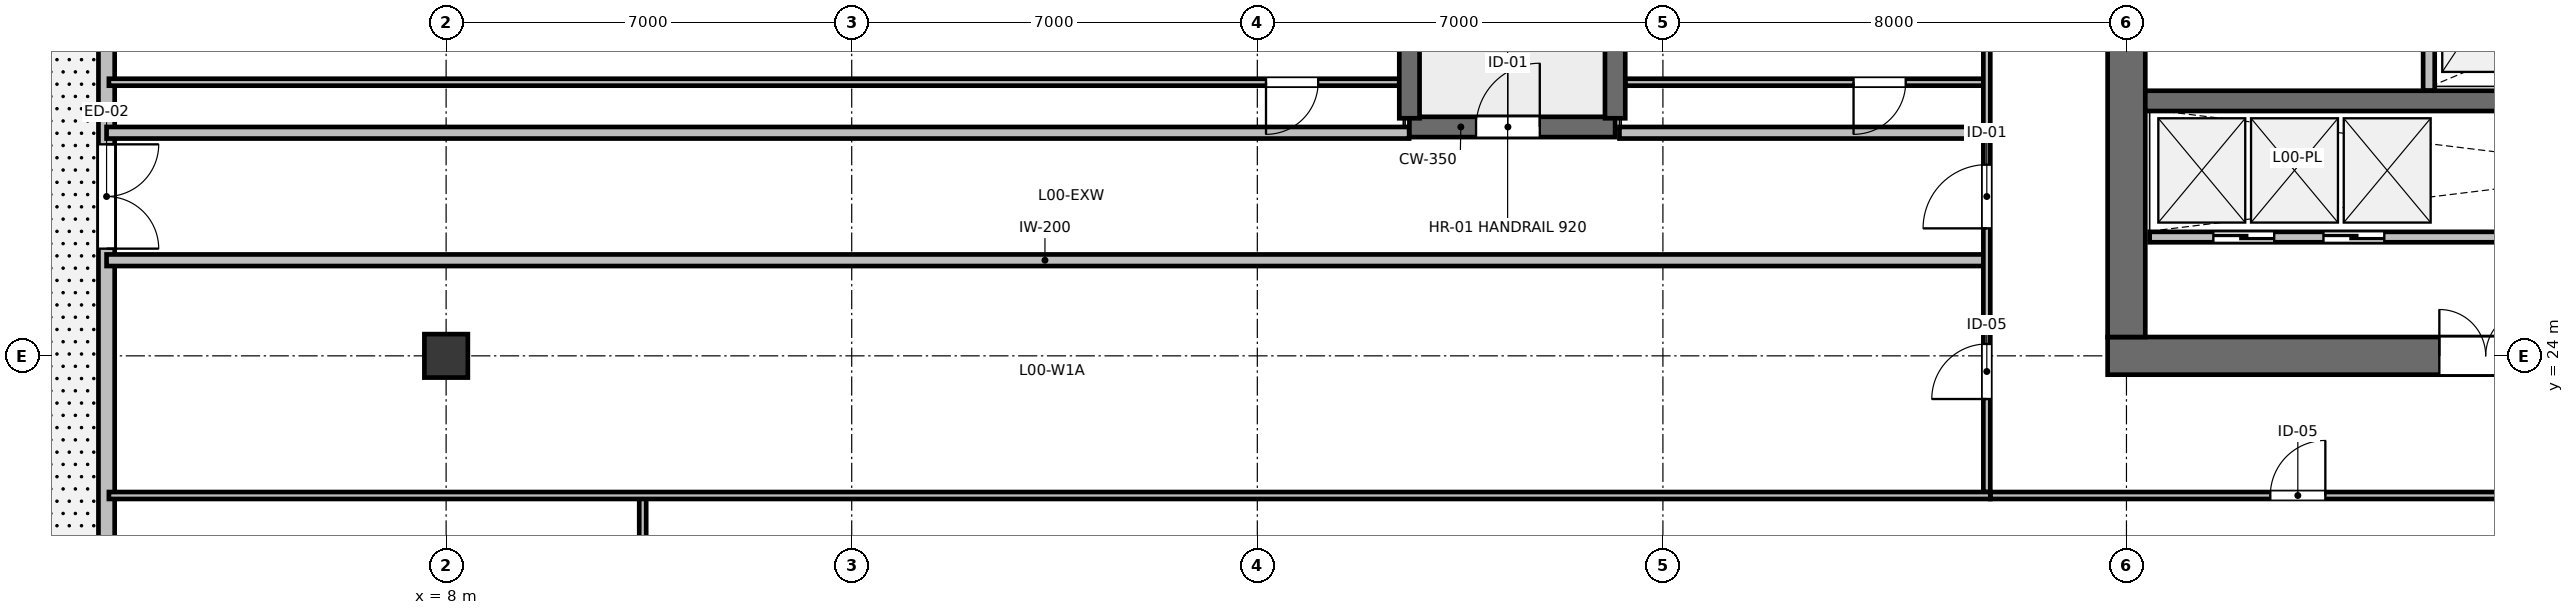
"""IFC4 building model, lengths in metres.
Left out: names, types, materials, properties, quantities, classifications, styles, units other than length and angle.
Written with IfcOpenShell. Run it as: python <this file> out.ifc"""

import sys

from ifc_helpers import new_model, si_unit, direction, frame, frame_2d, origin, origin_2d, place, context, subcontext, project, spatial, rectangle, extrude, element, fill, save


model = new_model("IFC4")
c1 = context("Model", 3, precision=1e-05, world=origin(), true_north=direction((0.0, 1.0)))
c2 = subcontext(c1, "Body", "Model", "MODEL_VIEW")
j1 = project(units=[si_unit("LENGTHUNIT", "METRE"), si_unit("PLANEANGLEUNIT", "RADIAN")], contexts=[c1])
p1 = place(None, origin())
s1 = spatial("IfcSite", under=j1, at=p1, CompositionType="ELEMENT")
p2 = place(p1, origin())
s2 = spatial("IfcBuilding", under=s1, at=p2, CompositionType="ELEMENT")
p3 = place(p2, origin())
s3 = spatial("IfcBuildingStorey", under=s2, at=p3, CompositionType="ELEMENT", Elevation=0.0)
p4 = place(p3, frame((36.675, 24.0, 0.0), z_axis=(0.0, 0.0, 1.0), x_axis=(1.0, 0.0, 0.0)))
e1 = element("IfcWall", 1, at=p4, inside=s3, PredefinedType="SHEAR", context=c2, shape_type="SweptSolid", body=[
    extrude(rectangle(XDim=18.65, YDim=0.65, at=frame_2d((9.325, 0.0))), origin(), (0.0, 0.0, 1.0), 4.72),
])
p5 = place(p4, frame((5.725, 0.0, 0.0)))
e2 = element("IfcOpeningElement", 2, at=p5, cuts=e1, PredefinedType="OPENING", context=c2, shape_type="SweptSolid", body=[
    extrude(rectangle(XDim=1.6, YDim=2.15, at=frame_2d((0.8, 1.075))), frame((0.0, 0.335, 0.0), z_axis=(0.0, -1.0, 0.0), x_axis=(1.0, 0.0, 0.0)), (0.0, 0.0, 1.0), 0.67),
])
p6 = place(p4, frame((12.125, 0.0, 0.0)))
e3 = element("IfcOpeningElement", 3, at=p6, cuts=e1, PredefinedType="OPENING", context=c2, shape_type="SweptSolid", body=[
    extrude(rectangle(XDim=1.6, YDim=2.15, at=frame_2d((0.8, 1.075))), frame((0.0, 0.335, 0.0), z_axis=(0.0, -1.0, 0.0), x_axis=(1.0, 0.0, 0.0)), (0.0, 0.0, 1.0), 0.67),
])
p7 = place(p3, frame((37.0, 24.325, 0.0), z_axis=(0.0, 0.0, 1.0), x_axis=(0.0, 1.0, 0.0)))
e4 = element("IfcWall", 4, at=p7, inside=s3, PredefinedType="SHEAR", context=c2, shape_type="SweptSolid", body=[
    extrude(rectangle(XDim=15.35, YDim=0.65, at=frame_2d((7.675, 0.0))), origin(), (0.0, 0.0, 1.0), 4.72),
])
p8 = place(p7, frame((5.2, 0.0, 0.0)))
e5 = element("IfcOpeningElement", 5, at=p8, cuts=e4, PredefinedType="OPENING", context=c2, shape_type="SweptSolid", body=[
    extrude(rectangle(XDim=1.15, YDim=2.15, at=frame_2d((0.575, 1.075))), frame((0.0, 0.335, 0.0), z_axis=(0.0, -1.0, 0.0), x_axis=(1.0, 0.0, 0.0)), (0.0, 0.0, 1.0), 0.67),
])
p9 = place(p3, frame((37.325, 28.4, 0.0), z_axis=(0.0, 0.0, 1.0), x_axis=(1.0, 0.0, 0.0)))
e6 = element("IfcWall", 6, at=p9, inside=s3, PredefinedType="SHEAR", context=c2, shape_type="SweptSolid", body=[
    extrude(rectangle(XDim=17.35, YDim=0.35, at=frame_2d((8.675, 0.0))), origin(), (0.0, 0.0, 1.0), 4.72),
])
p10 = place(p3, frame((2.14, 57.64, 0.0), z_axis=(0.0, 0.0, 1.0), x_axis=(0.0, -1.0, 0.0)))
e7 = element("IfcWall", 7, at=p10, inside=s3, PredefinedType="STANDARD", context=c2, shape_type="SweptSolid", body=[
    extrude(rectangle(XDim=51.28, YDim=0.28, at=frame_2d((25.64, 0.0))), origin(), (0.0, 0.0, 1.0), 4.72),
])
p11 = place(p10, frame((29.99, 0.0, 0.0)))
e8 = element("IfcOpeningElement", 8, at=p11, cuts=e7, PredefinedType="OPENING", context=c2, shape_type="SweptSolid", body=[
    extrude(rectangle(XDim=1.8, YDim=2.4, at=frame_2d((0.9, 1.2))), frame((0.0, 0.15, 0.0), z_axis=(0.0, -1.0, 0.0), x_axis=(1.0, 0.0, 0.0)), (0.0, 0.0, 1.0), 0.3),
])
p12 = place(p10, frame((1.788, 0.0, 0.85)))
e9 = element("IfcOpeningElement", 9, at=p12, cuts=e7, PredefinedType="OPENING", context=c2, shape_type="SweptSolid", body=[
    extrude(rectangle(XDim=2.4, YDim=2.4, at=frame_2d((1.2, 1.2))), frame((0.0, 0.15, 0.0), z_axis=(0.0, -1.0, 0.0), x_axis=(1.0, 0.0, 0.0)), (0.0, 0.0, 1.0), 0.3),
])
p13 = place(p10, frame((5.563, 0.0, 0.85)))
e10 = element("IfcOpeningElement", 10, at=p13, cuts=e7, PredefinedType="OPENING", context=c2, shape_type="SweptSolid", body=[
    extrude(rectangle(XDim=2.4, YDim=2.4, at=frame_2d((1.2, 1.2))), frame((0.0, 0.15, 0.0), z_axis=(0.0, -1.0, 0.0), x_axis=(1.0, 0.0, 0.0)), (0.0, 0.0, 1.0), 0.3),
])
p14 = place(p10, frame((9.338, 0.0, 0.85)))
e11 = element("IfcOpeningElement", 11, at=p14, cuts=e7, PredefinedType="OPENING", context=c2, shape_type="SweptSolid", body=[
    extrude(rectangle(XDim=2.4, YDim=2.4, at=frame_2d((1.2, 1.2))), frame((0.0, 0.15, 0.0), z_axis=(0.0, -1.0, 0.0), x_axis=(1.0, 0.0, 0.0)), (0.0, 0.0, 1.0), 0.3),
])
p15 = place(p10, frame((16.889, 0.0, 0.85)))
e12 = element("IfcOpeningElement", 12, at=p15, cuts=e7, PredefinedType="OPENING", context=c2, shape_type="SweptSolid", body=[
    extrude(rectangle(XDim=2.4, YDim=2.4, at=frame_2d((1.2, 1.2))), frame((0.0, 0.15, 0.0), z_axis=(0.0, -1.0, 0.0), x_axis=(1.0, 0.0, 0.0)), (0.0, 0.0, 1.0), 0.3),
])
p16 = place(p10, frame((20.665, 0.0, 0.85)))
e13 = element("IfcOpeningElement", 13, at=p16, cuts=e7, PredefinedType="OPENING", context=c2, shape_type="SweptSolid", body=[
    extrude(rectangle(XDim=2.4, YDim=2.4, at=frame_2d((1.2, 1.2))), frame((0.0, 0.15, 0.0), z_axis=(0.0, -1.0, 0.0), x_axis=(1.0, 0.0, 0.0)), (0.0, 0.0, 1.0), 0.3),
])
p17 = place(p10, frame((24.44, 0.0, 0.85)))
e14 = element("IfcOpeningElement", 14, at=p17, cuts=e7, PredefinedType="OPENING", context=c2, shape_type="SweptSolid", body=[
    extrude(rectangle(XDim=2.4, YDim=2.4, at=frame_2d((1.2, 1.2))), frame((0.0, 0.15, 0.0), z_axis=(0.0, -1.0, 0.0), x_axis=(1.0, 0.0, 0.0)), (0.0, 0.0, 1.0), 0.3),
])
p18 = place(p10, frame((39.542, 0.0, 0.85)))
e15 = element("IfcOpeningElement", 15, at=p18, cuts=e7, PredefinedType="OPENING", context=c2, shape_type="SweptSolid", body=[
    extrude(rectangle(XDim=2.4, YDim=2.4, at=frame_2d((1.2, 1.2))), frame((0.0, 0.15, 0.0), z_axis=(0.0, -1.0, 0.0), x_axis=(1.0, 0.0, 0.0)), (0.0, 0.0, 1.0), 0.3),
])
p19 = place(p10, frame((43.317, 0.0, 0.85)))
e16 = element("IfcOpeningElement", 16, at=p19, cuts=e7, PredefinedType="OPENING", context=c2, shape_type="SweptSolid", body=[
    extrude(rectangle(XDim=2.4, YDim=2.4, at=frame_2d((1.2, 1.2))), frame((0.0, 0.15, 0.0), z_axis=(0.0, -1.0, 0.0), x_axis=(1.0, 0.0, 0.0)), (0.0, 0.0, 1.0), 0.3),
])
p20 = place(p10, frame((47.092, 0.0, 0.85)))
e17 = element("IfcOpeningElement", 17, at=p20, cuts=e7, PredefinedType="OPENING", context=c2, shape_type="SweptSolid", body=[
    extrude(rectangle(XDim=2.4, YDim=2.4, at=frame_2d((1.2, 1.2))), frame((0.0, 0.15, 0.0), z_axis=(0.0, -1.0, 0.0), x_axis=(1.0, 0.0, 0.0)), (0.0, 0.0, 1.0), 0.3),
])
p21 = place(p3, frame((42.22, 28.58, 0.0), z_axis=(0.0, 0.0, 1.0), x_axis=(0.0, 1.0, 0.0)))
e18 = element("IfcWall", 18, at=p21, inside=s3, PredefinedType="PARTITIONING", context=c2, shape_type="SweptSolid", body=[
    extrude(rectangle(XDim=3.04, YDim=0.2, at=frame_2d((1.52, 0.0))), origin(), (0.0, 0.0, 1.0), 4.72),
])
p22 = place(p21, frame((0.95, 0.0, 0.0)))
e19 = element("IfcOpeningElement", 19, at=p22, cuts=e18, PredefinedType="OPENING", context=c2, shape_type="SweptSolid", body=[
    extrude(rectangle(XDim=1.05, YDim=2.15, at=frame_2d((0.525, 1.075))), frame((0.0, 0.11, 0.0), z_axis=(0.0, -1.0, 0.0), x_axis=(1.0, 0.0, 0.0)), (0.0, 0.0, 1.0), 0.22),
])
p23 = place(p3, frame((37.4, 26.05, 0.0), z_axis=(0.0, 0.0, 1.0), x_axis=(1.0, 0.0, 0.0)))
e20 = element("IfcWall", 20, at=p23, inside=s3, PredefinedType="PARTITIONING", context=c2, shape_type="SweptSolid", body=[
    extrude(rectangle(XDim=17.2, YDim=0.18, at=frame_2d((8.6, 0.0))), origin(), (0.0, 0.0, 1.0), 4.72),
])
p24 = place(p23, frame((1.1, 0.0, 0.0)))
e21 = element("IfcOpeningElement", 21, at=p24, cuts=e20, PredefinedType="OPENING", context=c2, shape_type="SweptSolid", body=[
    extrude(rectangle(XDim=1.05, YDim=2.15, at=frame_2d((0.525, 1.075))), frame((0.0, 0.1, 0.0), z_axis=(0.0, -1.0, 0.0), x_axis=(1.0, 0.0, 0.0)), (0.0, 0.0, 1.0), 0.2),
])
p25 = place(p23, frame((3.0, 0.0, 0.0)))
e22 = element("IfcOpeningElement", 22, at=p25, cuts=e20, PredefinedType="OPENING", context=c2, shape_type="SweptSolid", body=[
    extrude(rectangle(XDim=1.05, YDim=2.15, at=frame_2d((0.525, 1.075))), frame((0.0, 0.1, 0.0), z_axis=(0.0, -1.0, 0.0), x_axis=(1.0, 0.0, 0.0)), (0.0, 0.0, 1.0), 0.2),
])
p26 = place(p23, frame((11.4, 0.0, 0.0)))
e23 = element("IfcOpeningElement", 23, at=p26, cuts=e20, PredefinedType="OPENING", context=c2, shape_type="SweptSolid", body=[
    extrude(rectangle(XDim=1.05, YDim=2.15, at=frame_2d((0.525, 1.075))), frame((0.0, 0.1, 0.0), z_axis=(0.0, -1.0, 0.0), x_axis=(1.0, 0.0, 0.0)), (0.0, 0.0, 1.0), 0.2),
])
p27 = place(p3, frame((2.14, 25.65, 0.0), z_axis=(0.0, 0.0, 1.0), x_axis=(1.0, 0.0, 0.0)))
e24 = element("IfcWall", 24, at=p27, inside=s3, PredefinedType="PARTITIONING", context=c2, shape_type="SweptSolid", body=[
    extrude(rectangle(XDim=32.39, YDim=0.2, at=frame_2d((16.195, 0.0))), origin(), (0.0, 0.0, 1.0), 4.72),
])
p28 = place(p3, frame((2.14, 27.85, 0.0), z_axis=(0.0, 0.0, 1.0), x_axis=(1.0, 0.0, 0.0)))
e25 = element("IfcWall", 25, at=p28, inside=s3, PredefinedType="PARTITIONING", context=c2, shape_type="SweptSolid", body=[
    extrude(rectangle(XDim=22.48, YDim=0.2, at=frame_2d((11.24, 0.0))), origin(), (0.0, 0.0, 1.0), 4.72),
])
p29 = place(p3, frame((28.25, 27.85, 0.0), z_axis=(0.0, 0.0, 1.0), x_axis=(1.0, 0.0, 0.0)))
e26 = element("IfcWall", 26, at=p29, inside=s3, PredefinedType="PARTITIONING", context=c2, shape_type="SweptSolid", body=[
    extrude(rectangle(XDim=6.28, YDim=0.2, at=frame_2d((3.14, 0.0))), origin(), (0.0, 0.0, 1.0), 4.72),
])
p30 = place(p3, frame((11.393, 21.59, 0.0), z_axis=(0.0, 0.0, 1.0), x_axis=(0.0, -1.0, 0.0)))
e27 = element("IfcWall", 27, at=p30, inside=s3, PredefinedType="MOVABLE", context=c2, shape_type="SweptSolid", body=[
    extrude(rectangle(XDim=19.41, YDim=0.12, at=frame_2d((9.705, 0.0))), origin(), (0.0, 0.0, 1.0), 3.82),
])
p31 = place(p30, frame((1.4, 0.0, 0.0)))
e28 = element("IfcOpeningElement", 28, at=p31, cuts=e27, PredefinedType="OPENING", context=c2, shape_type="SweptSolid", body=[
    extrude(rectangle(XDim=0.9, YDim=2.15, at=frame_2d((0.45, 1.075))), frame((0.0, 0.07, 0.0), z_axis=(0.0, -1.0, 0.0), x_axis=(1.0, 0.0, 0.0)), (0.0, 0.0, 1.0), 0.14),
])
p32 = place(p3, frame((34.65, 21.59, 0.0), z_axis=(0.0, 0.0, 1.0), x_axis=(1.0, 0.0, 0.0)))
e29 = element("IfcWall", 29, at=p32, inside=s3, PredefinedType="PARTITIONING", context=c2, shape_type="SweptSolid", body=[
    extrude(rectangle(XDim=22.7, YDim=0.12, at=frame_2d((11.35, 0.0))), origin(), (0.0, 0.0, 1.0), 3.82),
])
p33 = place(p32, frame((4.833, 0.0, 0.0)))
e30 = element("IfcOpeningElement", 30, at=p33, cuts=e29, PredefinedType="OPENING", context=c2, shape_type="SweptSolid", body=[
    extrude(rectangle(XDim=0.95, YDim=2.15, at=frame_2d((0.475, 1.075))), frame((0.0, 0.07, 0.0), z_axis=(0.0, -1.0, 0.0), x_axis=(1.0, 0.0, 0.0)), (0.0, 0.0, 1.0), 0.14),
])
p34 = place(p32, frame((16.042, 0.0, 0.0)))
e31 = element("IfcOpeningElement", 31, at=p34, cuts=e29, PredefinedType="OPENING", context=c2, shape_type="SweptSolid", body=[
    extrude(rectangle(XDim=0.95, YDim=2.15, at=frame_2d((0.475, 1.075))), frame((0.0, 0.07, 0.0), z_axis=(0.0, -1.0, 0.0), x_axis=(1.0, 0.0, 0.0)), (0.0, 0.0, 1.0), 0.14),
])
p35 = place(p3, frame((34.59, 28.722, 0.0), z_axis=(0.0, 0.0, 1.0), x_axis=(-1.0, 0.0, 0.0)))
e32 = element("IfcWall", 32, at=p35, inside=s3, PredefinedType="PARTITIONING", context=c2, shape_type="SweptSolid", body=[
    extrude(rectangle(XDim=6.24, YDim=0.12, at=frame_2d((3.12, 0.0))), origin(), (0.0, 0.0, 1.0), 3.82),
])
p36 = place(p35, frame((1.4, 0.0, 0.0)))
e33 = element("IfcOpeningElement", 33, at=p36, cuts=e32, PredefinedType="OPENING", context=c2, shape_type="SweptSolid", body=[
    extrude(rectangle(XDim=0.9, YDim=2.15, at=frame_2d((0.45, 1.075))), frame((0.0, 0.07, 0.0), z_axis=(0.0, -1.0, 0.0), x_axis=(1.0, 0.0, 0.0)), (0.0, 0.0, 1.0), 0.14),
])
p37 = place(p3, frame((24.45, 28.722, 0.0), z_axis=(0.0, 0.0, 1.0), x_axis=(-1.0, 0.0, 0.0)))
e34 = element("IfcWall", 34, at=p37, inside=s3, PredefinedType="PARTITIONING", context=c2, shape_type="SweptSolid", body=[
    extrude(rectangle(XDim=22.27, YDim=0.12, at=frame_2d((11.135, 0.0))), origin(), (0.0, 0.0, 1.0), 3.82),
])
p38 = place(p37, frame((1.4, 0.0, 0.0)))
e35 = element("IfcOpeningElement", 35, at=p38, cuts=e34, PredefinedType="OPENING", context=c2, shape_type="SweptSolid", body=[
    extrude(rectangle(XDim=0.9, YDim=2.15, at=frame_2d((0.45, 1.075))), frame((0.0, 0.07, 0.0), z_axis=(0.0, -1.0, 0.0), x_axis=(1.0, 0.0, 0.0)), (0.0, 0.0, 1.0), 0.14),
])
p39 = place(p3, frame((34.59, 21.65, 0.0), z_axis=(0.0, 0.0, 1.0), x_axis=(0.0, 1.0, 0.0)))
e36 = element("IfcWall", 36, at=p39, inside=s3, PredefinedType="PARTITIONING", context=c2, shape_type="SweptSolid", body=[
    extrude(rectangle(XDim=20.7, YDim=0.12, at=frame_2d((10.35, 0.0))), origin(), (0.0, 0.0, 1.0), 3.82),
])
p40 = place(p39, frame((1.605, 0.0, 0.0)))
e37 = element("IfcOpeningElement", 37, at=p40, cuts=e36, PredefinedType="OPENING", context=c2, shape_type="SweptSolid", body=[
    extrude(rectangle(XDim=0.95, YDim=2.15, at=frame_2d((0.475, 1.075))), frame((0.0, 0.07, 0.0), z_axis=(0.0, -1.0, 0.0), x_axis=(1.0, 0.0, 0.0)), (0.0, 0.0, 1.0), 0.14),
])
p41 = place(p39, frame((13.311, 0.0, 0.0)))
e38 = element("IfcOpeningElement", 38, at=p41, cuts=e36, PredefinedType="OPENING", context=c2, shape_type="SweptSolid", body=[
    extrude(rectangle(XDim=0.95, YDim=2.15, at=frame_2d((0.475, 1.075))), frame((0.0, 0.07, 0.0), z_axis=(0.0, -1.0, 0.0), x_axis=(1.0, 0.0, 0.0)), (0.0, 0.0, 1.0), 0.14),
])
p42 = place(p39, frame((4.55, 0.0, 0.0)))
e39 = element("IfcOpeningElement", 39, at=p42, cuts=e36, PredefinedType="OPENING", context=c2, shape_type="SweptSolid", body=[
    extrude(rectangle(XDim=1.1, YDim=2.15, at=frame_2d((0.55, 1.075))), frame((0.0, 0.07, 0.0), z_axis=(0.0, -1.0, 0.0), x_axis=(1.0, 0.0, 0.0)), (0.0, 0.0, 1.0), 0.14),
])
p43 = place(p3, frame((34.65, 21.59, 0.0), z_axis=(0.0, 0.0, 1.0), x_axis=(-1.0, 0.0, 0.0)))
e40 = element("IfcWall", 40, at=p43, inside=s3, PredefinedType="PARTITIONING", context=c2, shape_type="SweptSolid", body=[
    extrude(rectangle(XDim=32.47, YDim=0.12, at=frame_2d((16.235, 0.0))), origin(), (0.0, 0.0, 1.0), 3.82),
])
p44 = place(p3, frame((24.625, 27.95, 0.0), z_axis=(0.0, 0.0, 1.0), x_axis=(1.0, 0.0, 0.0)))
e41 = element("IfcWall", 41, at=p44, inside=s3, PredefinedType="SHEAR", context=c2, shape_type="SweptSolid", body=[
    extrude(rectangle(XDim=3.55, YDim=0.35, at=frame_2d((1.775, 0.0))), origin(), (0.0, 0.0, 1.0), 5.0),
])
p45 = place(p44, frame((1.15, 0.0, 0.0)))
e42 = element("IfcOpeningElement", 42, at=p45, cuts=e41, PredefinedType="OPENING", context=c2, shape_type="SweptSolid", body=[
    extrude(rectangle(XDim=1.1, YDim=2.15, at=frame_2d((0.55, 1.075))), frame((0.0, 0.185, 0.0), z_axis=(0.0, -1.0, 0.0), x_axis=(1.0, 0.0, 0.0)), (0.0, 0.0, 1.0), 0.37),
])
for number, where, z_axis, x_axis in (
    (43, (24.625, 28.1, 0.0), (0.0, 0.0, 1.0), (0.0, 1.0, 0.0)),
    (44, (28.175, 28.1, 0.0), (0.0, 0.0, 1.0), (0.0, 1.0, 0.0)),
):
    element("IfcWall", number, at=place(p3, frame(where, z_axis=z_axis, x_axis=x_axis)), inside=s3, PredefinedType="SHEAR", context=c2, shape_type="SweptSolid", body=[
        extrude(rectangle(XDim=7.7, YDim=0.35, at=frame_2d((3.85, 0.0))), origin(), (0.0, 0.0, 1.0), 5.0),
    ])
p46 = place(p3, frame((8.0, 24.0, 0.0), z_axis=(0.0, 0.0, 1.0), x_axis=(1.0, 0.0, 0.0)))
e45 = element("IfcColumn", 45, at=p46, inside=s3, PredefinedType="PILASTER", context=c2, shape_type="SweptSolid", body=[
    extrude(rectangle(XDim=0.75, YDim=0.75, at=origin_2d()), origin(), (0.0, 0.0, 1.0), 4.72),
])
p47 = place(p11, frame((1.8, 0.0, 0.0), z_axis=(0.0, 0.0, 1.0), x_axis=(-1.0, 0.0, 0.0)))
e46 = element("IfcDoor", 46, at=p47, inside=s3, OperationType="DOUBLE_DOOR_SINGLE_SWING", PredefinedType="DOOR", context=c2, shape_type="SweptSolid", body=[
    extrude(rectangle(XDim=1.8, YDim=2.4, at=frame_2d((0.9, 1.2))), frame((0.0, 0.025, 0.0), z_axis=(0.0, -1.0, 0.0), x_axis=(1.0, 0.0, 0.0)), (0.0, 0.0, 1.0), 0.05),
])
fill(e8, e46)
p48 = place(p5, origin())
e47 = element("IfcDoor", 47, at=p48, inside=s3, OperationType="DOUBLE_DOOR_SINGLE_SWING", PredefinedType="DOOR", context=c2, shape_type="SweptSolid", body=[
    extrude(rectangle(XDim=1.6, YDim=2.15, at=frame_2d((0.8, 1.075))), frame((0.0, 0.025, 0.0), z_axis=(0.0, -1.0, 0.0), x_axis=(1.0, 0.0, 0.0)), (0.0, 0.0, 1.0), 0.05),
])
fill(e2, e47)
p49 = place(p24, origin())
e48 = element("IfcDoor", 48, at=p49, inside=s3, OperationType="SLIDING_TO_LEFT", PredefinedType="DOOR", context=c2, shape_type="SweptSolid", body=[
    extrude(rectangle(XDim=1.05, YDim=2.15, at=frame_2d((0.525, 1.075))), frame((0.0, 0.025, 0.0), z_axis=(0.0, -1.0, 0.0), x_axis=(1.0, 0.0, 0.0)), (0.0, 0.0, 1.0), 0.05),
])
fill(e21, e48)
p50 = place(p25, origin())
e49 = element("IfcDoor", 49, at=p50, inside=s3, OperationType="SLIDING_TO_RIGHT", PredefinedType="DOOR", context=c2, shape_type="SweptSolid", body=[
    extrude(rectangle(XDim=1.05, YDim=2.15, at=frame_2d((0.525, 1.075))), frame((0.0, 0.025, 0.0), z_axis=(0.0, -1.0, 0.0), x_axis=(1.0, 0.0, 0.0)), (0.0, 0.0, 1.0), 0.05),
])
fill(e22, e49)
p51 = place(p33, origin())
e50 = element("IfcDoor", 50, at=p51, inside=s3, OperationType="SINGLE_SWING_RIGHT", PredefinedType="DOOR", context=c2, shape_type="SweptSolid", body=[
    extrude(rectangle(XDim=0.95, YDim=2.15, at=frame_2d((0.475, 1.075))), frame((0.0, 0.025, 0.0), z_axis=(0.0, -1.0, 0.0), x_axis=(1.0, 0.0, 0.0)), (0.0, 0.0, 1.0), 0.05),
])
fill(e30, e50)
p52 = place(p36, origin())
e51 = element("IfcDoor", 51, at=p52, inside=s3, OperationType="SINGLE_SWING_RIGHT", PredefinedType="DOOR", context=c2, shape_type="SweptSolid", body=[
    extrude(rectangle(XDim=0.9, YDim=2.15, at=frame_2d((0.45, 1.075))), frame((0.0, 0.025, 0.0), z_axis=(0.0, -1.0, 0.0), x_axis=(1.0, 0.0, 0.0)), (0.0, 0.0, 1.0), 0.05),
])
fill(e33, e51)
p53 = place(p38, origin())
e52 = element("IfcDoor", 52, at=p53, inside=s3, OperationType="SINGLE_SWING_RIGHT", PredefinedType="DOOR", context=c2, shape_type="SweptSolid", body=[
    extrude(rectangle(XDim=0.9, YDim=2.15, at=frame_2d((0.45, 1.075))), frame((0.0, 0.025, 0.0), z_axis=(0.0, -1.0, 0.0), x_axis=(1.0, 0.0, 0.0)), (0.0, 0.0, 1.0), 0.05),
])
fill(e35, e52)
p54 = place(p40, origin())
e53 = element("IfcDoor", 53, at=p54, inside=s3, OperationType="SINGLE_SWING_LEFT", PredefinedType="DOOR", context=c2, shape_type="SweptSolid", body=[
    extrude(rectangle(XDim=0.95, YDim=2.15, at=frame_2d((0.475, 1.075))), frame((0.0, 0.025, 0.0), z_axis=(0.0, -1.0, 0.0), x_axis=(1.0, 0.0, 0.0)), (0.0, 0.0, 1.0), 0.05),
])
fill(e37, e53)
p55 = place(p42, origin())
e54 = element("IfcDoor", 54, at=p55, inside=s3, OperationType="SINGLE_SWING_LEFT", PredefinedType="DOOR", context=c2, shape_type="SweptSolid", body=[
    extrude(rectangle(XDim=1.1, YDim=2.15, at=frame_2d((0.55, 1.075))), frame((0.0, 0.025, 0.0), z_axis=(0.0, -1.0, 0.0), x_axis=(1.0, 0.0, 0.0)), (0.0, 0.0, 1.0), 0.05),
])
fill(e39, e54)
p56 = place(p45, origin())
e55 = element("IfcDoor", 55, at=p56, inside=s3, OperationType="SINGLE_SWING_RIGHT", PredefinedType="DOOR", context=c2, shape_type="SweptSolid", body=[
    extrude(rectangle(XDim=1.1, YDim=2.15, at=frame_2d((0.55, 1.075))), frame((0.0, 0.025, 0.0), z_axis=(0.0, -1.0, 0.0), x_axis=(1.0, 0.0, 0.0)), (0.0, 0.0, 1.0), 0.05),
])
fill(e42, e55)
save(model, sys.argv[1])
